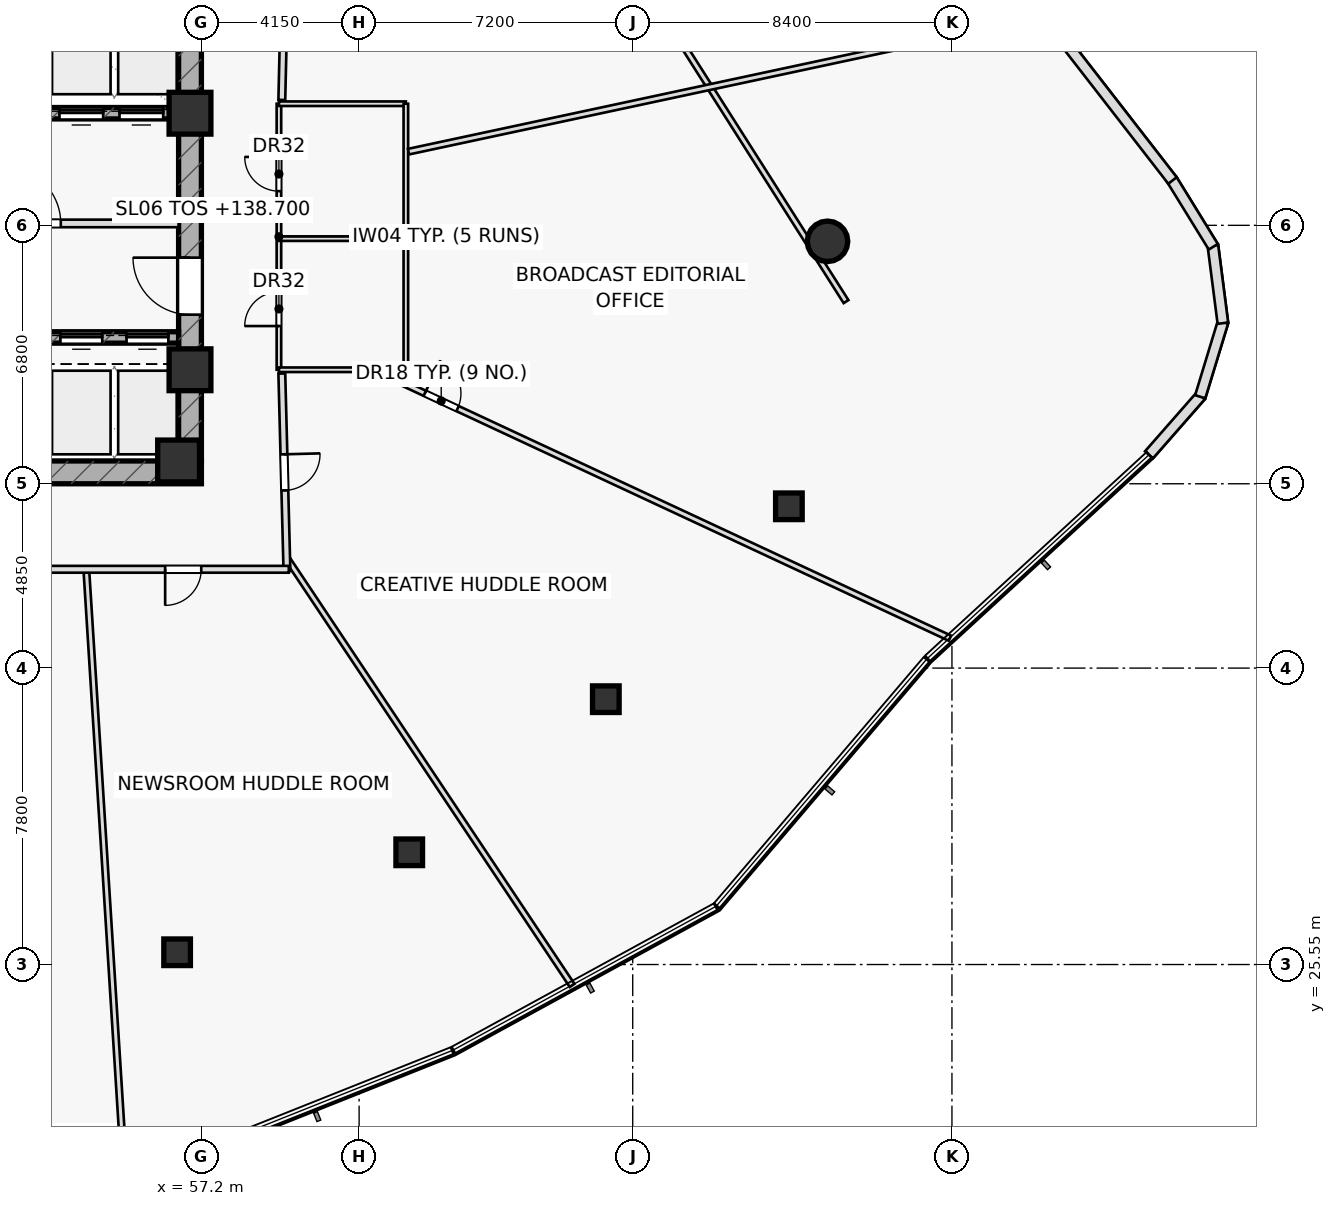
"""IFC4 building model, lengths in metres.
Left out: names, types, materials, properties, quantities, classifications, styles, units other than length and angle.
Written with IfcOpenShell. Run it as: python <this file> out.ifc"""

import sys

from ifc_helpers import new_model, si_unit, direction, frame, frame_2d, origin, origin_2d, place, context, subcontext, project, spatial, rectangle, hollow_rectangle, hollow_circle, extrude, element, fill, save


model = new_model("IFC4")
c1 = context("Model", 3, precision=1e-05, world=origin(), true_north=direction((0.0, 1.0)))
c2 = subcontext(c1, "Body", "Model", "MODEL_VIEW")
j1 = project(units=[si_unit("LENGTHUNIT", "METRE"), si_unit("PLANEANGLEUNIT", "RADIAN")], contexts=[c1])
p1 = place(None, origin())
s1 = spatial("IfcSite", under=j1, at=p1, CompositionType="ELEMENT")
p2 = place(p1, origin())
s2 = spatial("IfcBuilding", under=s1, at=p2, CompositionType="ELEMENT")
p3 = place(p2, frame((0.0, 0.0, 138.7)))
s3 = spatial("IfcBuildingStorey", under=s2, at=p3, CompositionType="ELEMENT", Elevation=138.7)
p4 = place(p3, frame((42.8, 38.5, 0.0), z_axis=(0.0, 0.0, 1.0), x_axis=(1.0, 0.0, 0.0)))
e1 = element("IfcWall", 1, at=p4, inside=s3, PredefinedType="SHEAR", context=c2, shape_type="SweptSolid", body=[
    extrude(rectangle(XDim=14.4, YDim=0.6, at=frame_2d((7.2, 0.0))), origin(), (0.0, 0.0, 1.0), 3.55),
])
p5 = place(p4, frame((0.88, 0.0, 0.0)))
e2 = element("IfcOpeningElement", 2, at=p5, cuts=e1, PredefinedType="OPENING", context=c2, shape_type="SweptSolid", body=[
    extrude(rectangle(XDim=1.05, YDim=2.2, at=frame_2d((0.525, 1.1))), frame((0.0, 0.31, 0.0), z_axis=(0.0, -1.0, 0.0), x_axis=(1.0, 0.0, 0.0)), (0.0, 0.0, 1.0), 0.62),
])
p6 = place(p3, frame((56.9, 38.8, 0.0), z_axis=(0.0, 0.0, 1.0), x_axis=(0.0, 1.0, 0.0)))
e3 = element("IfcWall", 3, at=p6, inside=s3, PredefinedType="SHEAR", context=c2, shape_type="SweptSolid", body=[
    extrude(rectangle(XDim=12.4, YDim=0.6, at=frame_2d((6.2, 0.0))), origin(), (0.0, 0.0, 1.0), 3.55),
])
p7 = place(p6, frame((3.85, 0.0, 0.0)))
e4 = element("IfcOpeningElement", 4, at=p7, cuts=e3, PredefinedType="OPENING", context=c2, shape_type="SweptSolid", body=[
    extrude(rectangle(XDim=1.5, YDim=2.2, at=frame_2d((0.75, 1.1))), frame((0.0, 0.31, 0.0), z_axis=(0.0, -1.0, 0.0), x_axis=(1.0, 0.0, 0.0)), (0.0, 0.0, 1.0), 0.62),
])
p8 = place(p3, frame((43.4, 47.95, 0.0), z_axis=(0.0, 0.0, 1.0), x_axis=(1.0, 0.0, 0.0)))
e5 = element("IfcWall", 5, at=p8, inside=s3, PredefinedType="SHEAR", context=c2, shape_type="SweptSolid", body=[
    extrude(rectangle(XDim=13.2, YDim=0.3, at=frame_2d((6.6, 0.0))), origin(), (0.0, 0.0, 1.0), 3.55),
])
p9 = place(p8, frame((8.345, 0.0, 0.0)))
e6 = element("IfcOpeningElement", 6, at=p9, cuts=e5, PredefinedType="OPENING", context=c2, shape_type="SweptSolid", body=[
    extrude(rectangle(XDim=1.15, YDim=2.2, at=frame_2d((0.575, 1.1))), frame((0.0, 0.16, 0.0), z_axis=(0.0, -1.0, 0.0), x_axis=(1.0, 0.0, 0.0)), (0.0, 0.0, 1.0), 0.32),
])
p10 = place(p8, frame((10.065, 0.0, 0.0)))
e7 = element("IfcOpeningElement", 7, at=p10, cuts=e5, PredefinedType="OPENING", context=c2, shape_type="SweptSolid", body=[
    extrude(rectangle(XDim=1.15, YDim=2.2, at=frame_2d((0.575, 1.1))), frame((0.0, 0.16, 0.0), z_axis=(0.0, -1.0, 0.0), x_axis=(1.0, 0.0, 0.0)), (0.0, 0.0, 1.0), 0.32),
])
p11 = place(p8, frame((11.645, 0.0, 0.0)))
e8 = element("IfcOpeningElement", 8, at=p11, cuts=e5, PredefinedType="OPENING", context=c2, shape_type="SweptSolid", body=[
    extrude(rectangle(XDim=1.15, YDim=2.2, at=frame_2d((0.575, 1.1))), frame((0.0, 0.16, 0.0), z_axis=(0.0, -1.0, 0.0), x_axis=(1.0, 0.0, 0.0)), (0.0, 0.0, 1.0), 0.32),
])
p12 = place(p3, frame((43.4, 42.05, 0.0), z_axis=(0.0, 0.0, 1.0), x_axis=(1.0, 0.0, 0.0)))
e9 = element("IfcWall", 9, at=p12, inside=s3, PredefinedType="SHEAR", context=c2, shape_type="SweptSolid", body=[
    extrude(rectangle(XDim=13.2, YDim=0.3, at=frame_2d((6.6, 0.0))), origin(), (0.0, 0.0, 1.0), 3.55),
])
p13 = place(p12, frame((8.37, 0.0, 0.0)))
e10 = element("IfcOpeningElement", 10, at=p13, cuts=e9, PredefinedType="OPENING", context=c2, shape_type="SweptSolid", body=[
    extrude(rectangle(XDim=1.1, YDim=2.15, at=frame_2d((0.55, 1.075))), frame((0.0, 0.16, 0.0), z_axis=(0.0, -1.0, 0.0), x_axis=(1.0, 0.0, 0.0)), (0.0, 0.0, 1.0), 0.32),
])
p14 = place(p12, frame((10.09, 0.0, 0.0)))
e11 = element("IfcOpeningElement", 11, at=p14, cuts=e9, PredefinedType="OPENING", context=c2, shape_type="SweptSolid", body=[
    extrude(rectangle(XDim=1.1, YDim=2.15, at=frame_2d((0.55, 1.075))), frame((0.0, 0.16, 0.0), z_axis=(0.0, -1.0, 0.0), x_axis=(1.0, 0.0, 0.0)), (0.0, 0.0, 1.0), 0.32),
])
p15 = place(p12, frame((11.83, 0.0, 0.0)))
e12 = element("IfcOpeningElement", 12, at=p15, cuts=e9, PredefinedType="OPENING", context=c2, shape_type="SweptSolid", body=[
    extrude(rectangle(XDim=1.1, YDim=2.15, at=frame_2d((0.55, 1.075))), frame((0.0, 0.16, 0.0), z_axis=(0.0, -1.0, 0.0), x_axis=(1.0, 0.0, 0.0)), (0.0, 0.0, 1.0), 0.32),
])
for number, where, z_axis, x_axis in (
    (13, (56.9, 47.95, 0.0), (0.0, 0.0, 1.0), (1.0, 0.0, 0.0)),
    (14, (56.9, 41.2, 0.0), (0.0, 0.0, 1.0), (1.0, 0.0, 0.0)),
    (15, (56.6, 38.8, 0.0), (0.0, 0.0, 1.0), (1.0, 0.0, 0.0)),
):
    element("IfcColumn", number, at=place(p3, frame(where, z_axis=z_axis, x_axis=x_axis)), inside=s3, PredefinedType="COLUMN", context=c2, shape_type="SweptSolid", body=[
        extrude(rectangle(XDim=1.1, YDim=1.1, at=origin_2d()), origin(), (0.0, 0.0, 1.0), 3.55),
    ])
for number, where, z_axis, x_axis in (
    (16, (56.561, 25.873, 0.0), (0.0, 0.0, 1.0), (1.0, 0.0, 0.0)),
    (17, (62.669, 28.503, 0.0), (0.0, 0.0, 1.0), (1.0, 0.0, 0.0)),
    (18, (67.842, 32.532, 0.0), (0.0, 0.0, 1.0), (1.0, 0.0, 0.0)),
    (19, (72.659, 37.607, 0.0), (0.0, 0.0, 1.0), (1.0, 0.0, 0.0)),
):
    element("IfcColumn", number, at=place(p3, frame(where, z_axis=z_axis, x_axis=x_axis)), inside=s3, PredefinedType="COLUMN", context=c2, shape_type="SweptSolid", body=[
        extrude(hollow_rectangle(XDim=0.7, YDim=0.7, WallThickness=0.04, at=origin_2d()), origin(), (0.0, 0.0, 1.0), 3.55),
    ])
p16 = place(p3, frame((73.676, 44.58, 0.0), z_axis=(0.0, 0.0, 1.0), x_axis=(1.0, 0.0, 0.0)))
e20 = element("IfcColumn", 20, at=p16, inside=s3, PredefinedType="COLUMN", context=c2, shape_type="SweptSolid", body=[
    extrude(hollow_circle(Radius=0.533, WallThickness=0.045, at=origin_2d()), origin(), (0.0, 0.0, 1.0), 3.55),
])
p17 = place(p3, frame((50.65, 45.05, 0.0), z_axis=(0.0, 0.0, 1.0), x_axis=(1.0, 0.0, 0.0)))
e21 = element("IfcWall", 21, at=p17, inside=s3, PredefinedType="PARTITIONING", context=c2, shape_type="SweptSolid", body=[
    extrude(rectangle(XDim=5.95, YDim=0.2, at=frame_2d((2.975, 0.0))), origin(), (0.0, 0.0, 1.0), 3.55),
])
p18 = place(p17, frame((1.35, 0.0, 0.0)))
e22 = element("IfcOpeningElement", 22, at=p18, cuts=e21, PredefinedType="OPENING", context=c2, shape_type="SweptSolid", body=[
    extrude(rectangle(XDim=1.5, YDim=2.2, at=frame_2d((0.75, 1.1))), frame((0.0, 0.11, 0.0), z_axis=(0.0, -1.0, 0.0), x_axis=(1.0, 0.0, 0.0)), (0.0, 0.0, 1.0), 0.22),
])
p19 = place(p3, frame((74.163, 42.993, 0.0), z_axis=(0.0, 0.0, 1.0), x_axis=(-0.53628142437, 0.844039237166, 0.0)))
e23 = element("IfcWall", 23, at=p19, inside=s3, PredefinedType="PARTITIONING", context=c2, shape_type="SweptSolid", body=[
    extrude(rectangle(XDim=10.267, YDim=0.15, at=frame_2d((5.133, 0.0))), origin(), (0.0, 0.0, 1.0), 2.835),
])
p20 = place(p3, frame((59.24, 41.2, 0.0), z_axis=(0.0, 0.0, 1.0), x_axis=(0.0, 1.0, 0.0)))
e24 = element("IfcWall", 24, at=p20, inside=s3, PredefinedType="PARTITIONING", context=c2, shape_type="SweptSolid", body=[
    extrude(rectangle(XDim=7.0, YDim=0.12, at=frame_2d((3.5, 0.0))), origin(), (0.0, 0.0, 1.0), 3.55),
])
p21 = place(p20, frame((1.15, 0.0, 0.0)))
e25 = element("IfcOpeningElement", 25, at=p21, cuts=e24, PredefinedType="OPENING", context=c2, shape_type="SweptSolid", body=[
    extrude(rectangle(XDim=0.9, YDim=2.05, at=frame_2d((0.45, 1.025))), frame((0.0, 0.07, 0.0), z_axis=(0.0, -1.0, 0.0), x_axis=(1.0, 0.0, 0.0)), (0.0, 0.0, 1.0), 0.14),
])
p22 = place(p20, frame((4.7, 0.0, 0.0)))
e26 = element("IfcOpeningElement", 26, at=p22, cuts=e24, PredefinedType="OPENING", context=c2, shape_type="SweptSolid", body=[
    extrude(rectangle(XDim=0.9, YDim=2.05, at=frame_2d((0.45, 1.025))), frame((0.0, 0.07, 0.0), z_axis=(0.0, -1.0, 0.0), x_axis=(1.0, 0.0, 0.0)), (0.0, 0.0, 1.0), 0.14),
])
for number, where, z_axis, x_axis in (
    (27, (59.24, 41.2, 0.0), (0.0, 0.0, 1.0), (1.0, 0.0, 0.0)),
    (28, (59.24, 44.65, 0.0), (0.0, 0.0, 1.0), (1.0, 0.0, 0.0)),
    (29, (59.24, 48.2, 0.0), (0.0, 0.0, 1.0), (1.0, 0.0, 0.0)),
):
    element("IfcWall", number, at=place(p3, frame(where, z_axis=z_axis, x_axis=x_axis)), inside=s3, PredefinedType="PARTITIONING", context=c2, shape_type="SweptSolid", body=[
        extrude(rectangle(XDim=3.34, YDim=0.12, at=frame_2d((1.67, 0.0))), origin(), (0.0, 0.0, 1.0), 3.55),
    ])
p23 = place(p3, frame((62.58, 41.2, 0.0), z_axis=(0.0, 0.0, 1.0), x_axis=(0.0, 1.0, 0.0)))
e30 = element("IfcWall", 30, at=p23, inside=s3, PredefinedType="PARTITIONING", context=c2, shape_type="SweptSolid", body=[
    extrude(rectangle(XDim=7.0, YDim=0.12, at=frame_2d((3.5, 0.0))), origin(), (0.0, 0.0, 1.0), 3.55),
])
p24 = place(p3, frame((61.856, 41.15, 0.0), z_axis=(0.0, 0.0, 1.0), x_axis=(0.906306749667, -0.42262048638, 0.0)))
e31 = element("IfcWall", 31, at=p24, inside=s3, PredefinedType="PARTITIONING", context=c2, shape_type="SweptSolid", body=[
    extrude(rectangle(XDim=16.596, YDim=0.15, at=frame_2d((8.298, 0.0))), origin(), (0.0, 0.0, 1.0), 2.835),
])
p25 = place(p24, frame((1.35, 0.0, 0.0)))
e32 = element("IfcOpeningElement", 32, at=p25, cuts=e31, PredefinedType="OPENING", context=c2, shape_type="SweptSolid", body=[
    extrude(rectangle(XDim=0.95, YDim=2.05, at=frame_2d((0.475, 1.025))), frame((0.0, 0.085, 0.0), z_axis=(0.0, -1.0, 0.0), x_axis=(1.0, 0.0, 0.0)), (0.0, 0.0, 1.0), 0.17),
])
p26 = place(p3, frame((62.65, 46.938, 0.0), z_axis=(0.0, 0.0, 1.0), x_axis=(0.977819728846, 0.209448270173, 0.0)))
e33 = element("IfcWall", 33, at=p26, inside=s3, PredefinedType="PARTITIONING", context=c2, shape_type="SweptSolid", body=[
    extrude(rectangle(XDim=17.123, YDim=0.15, at=frame_2d((8.562, 0.0))), origin(), (0.0, 0.0, 1.0), 2.975),
])
p27 = place(p3, frame((54.171, 35.95, 0.0), z_axis=(0.0, 0.0, 1.0), x_axis=(0.062994339198, -0.998013884287, 0.0)))
e34 = element("IfcWall", 34, at=p27, inside=s3, PredefinedType="PARTITIONING", context=c2, shape_type="SweptSolid", body=[
    extrude(rectangle(XDim=15.642, YDim=0.15, at=frame_2d((7.821, 0.0))), origin(), (0.0, 0.0, 1.0), 2.975),
])
p28 = place(p3, frame((59.442, 36.251, 0.0), z_axis=(0.0, 0.0, 1.0), x_axis=(0.555320536671, -0.831636399847, 0.0)))
e35 = element("IfcWall", 35, at=p28, inside=s3, PredefinedType="PARTITIONING", context=c2, shape_type="SweptSolid", body=[
    extrude(rectangle(XDim=13.529, YDim=0.15, at=frame_2d((6.765, 0.0))), origin(), (0.0, 0.0, 1.0), 2.975),
])
p29 = place(p3, frame((59.451, 54.1, 0.0), z_axis=(0.0, 0.0, 1.0), x_axis=(-0.023271046154, -0.999729192537, 0.0)))
e36 = element("IfcWall", 36, at=p29, inside=s3, PredefinedType="PARTITIONING", context=c2, shape_type="SweptSolid", body=[
    extrude(rectangle(XDim=5.802, YDim=0.18, at=frame_2d((2.901, 0.0))), origin(), (0.0, 0.0, 1.0), 2.835),
])
p30 = place(p29, frame((2.426, 0.0, 0.0)))
e37 = element("IfcOpeningElement", 37, at=p30, cuts=e36, PredefinedType="OPENING", context=c2, shape_type="SweptSolid", body=[
    extrude(rectangle(XDim=0.95, YDim=2.05, at=frame_2d((0.475, 1.025))), frame((0.0, 0.1, 0.0), z_axis=(0.0, -1.0, 0.0), x_axis=(1.0, 0.0, 0.0)), (0.0, 0.0, 1.0), 0.2),
])
p31 = place(p3, frame((59.316, 41.1, 0.0), z_axis=(0.0, 0.0, 1.0), x_axis=(0.025953695765, -0.999663146103, 0.0)))
e38 = element("IfcWall", 38, at=p31, inside=s3, PredefinedType="PARTITIONING", context=c2, shape_type="SweptSolid", body=[
    extrude(rectangle(XDim=5.202, YDim=0.18, at=frame_2d((2.601, 0.0))), origin(), (0.0, 0.0, 1.0), 2.835),
])
p32 = place(p31, frame((2.126, 0.0, 0.0)))
e39 = element("IfcOpeningElement", 39, at=p32, cuts=e38, PredefinedType="OPENING", context=c2, shape_type="SweptSolid", body=[
    extrude(rectangle(XDim=0.95, YDim=2.05, at=frame_2d((0.475, 1.025))), frame((0.0, 0.1, 0.0), z_axis=(0.0, -1.0, 0.0), x_axis=(1.0, 0.0, 0.0)), (0.0, 0.0, 1.0), 0.2),
])
p33 = place(p3, frame((59.5, 35.95, 0.0), z_axis=(0.0, 0.0, 1.0), x_axis=(-1.0, 0.0, 0.0)))
e40 = element("IfcWall", 40, at=p33, inside=s3, PredefinedType="PARTITIONING", context=c2, shape_type="SweptSolid", body=[
    extrude(rectangle(XDim=19.75, YDim=0.18, at=frame_2d((9.875, 0.0))), origin(), (0.0, 0.0, 1.0), 2.835),
])
p34 = place(p33, frame((2.304, 0.0, 0.0)))
e41 = element("IfcOpeningElement", 41, at=p34, cuts=e40, PredefinedType="OPENING", context=c2, shape_type="SweptSolid", body=[
    extrude(rectangle(XDim=0.95, YDim=2.05, at=frame_2d((0.475, 1.025))), frame((0.0, 0.1, 0.0), z_axis=(0.0, -1.0, 0.0), x_axis=(1.0, 0.0, 0.0)), (0.0, 0.0, 1.0), 0.2),
])
p35 = place(p33, frame((11.55, 0.0, 0.0)))
e42 = element("IfcOpeningElement", 42, at=p35, cuts=e40, PredefinedType="OPENING", context=c2, shape_type="SweptSolid", body=[
    extrude(rectangle(XDim=0.95, YDim=2.05, at=frame_2d((0.475, 1.025))), frame((0.0, 0.1, 0.0), z_axis=(0.0, -1.0, 0.0), x_axis=(1.0, 0.0, 0.0)), (0.0, 0.0, 1.0), 0.2),
])
p36 = place(p3, frame((82.135, 38.962, 0.0), z_axis=(0.0, 0.0, 1.0), x_axis=(0.659399160017, 0.751793021894, 0.0)))
e43 = element("IfcWall", 43, at=p36, inside=s3, PredefinedType="STANDARD", context=c2, shape_type="SweptSolid", body=[
    extrude(rectangle(XDim=2.066, YDim=0.28, at=frame_2d((1.033, 0.0))), origin(), (0.0, 0.0, 1.0), 3.55),
])
p37 = place(p3, frame((83.483, 40.49, 0.0), z_axis=(0.0, 0.0, 1.0), x_axis=(0.291563452565, 0.956551490056, 0.0)))
e44 = element("IfcWall", 44, at=p37, inside=s3, PredefinedType="STANDARD", context=c2, shape_type="SweptSolid", body=[
    extrude(rectangle(XDim=2.055, YDim=0.28, at=frame_2d((1.027, 0.0))), origin(), (0.0, 0.0, 1.0), 3.55),
])
p38 = place(p3, frame((84.08, 42.426, 0.0), z_axis=(0.0, 0.0, 1.0), x_axis=(-0.127850692074, 0.991793426342, 0.0)))
e45 = element("IfcWall", 45, at=p38, inside=s3, PredefinedType="STANDARD", context=c2, shape_type="SweptSolid", body=[
    extrude(rectangle(XDim=2.055, YDim=0.28, at=frame_2d((1.027, 0.0))), origin(), (0.0, 0.0, 1.0), 3.55),
])
p39 = place(p3, frame((83.827, 44.436, 0.0), z_axis=(0.0, 0.0, 1.0), x_axis=(-0.524759556433, 0.851250496583, 0.0)))
e46 = element("IfcWall", 46, at=p39, inside=s3, PredefinedType="STANDARD", context=c2, shape_type="SweptSolid", body=[
    extrude(rectangle(XDim=2.077, YDim=0.28, at=frame_2d((1.039, 0.0))), origin(), (0.0, 0.0, 1.0), 3.55),
])
p40 = place(p3, frame((82.754, 46.18, 0.0), z_axis=(0.0, 0.0, 1.0), x_axis=(-0.613223319152, 0.7899095903, 0.0)))
e47 = element("IfcWall", 47, at=p40, inside=s3, PredefinedType="STANDARD", context=c2, shape_type="SweptSolid", body=[
    extrude(rectangle(XDim=7.967, YDim=0.28, at=frame_2d((3.984, 0.0))), origin(), (0.0, 0.0, 1.0), 3.55),
])
p41 = place(p7, origin())
e48 = element("IfcDoor", 48, at=p41, inside=s3, OperationType="SINGLE_SWING_RIGHT", PredefinedType="DOOR", context=c2, shape_type="SweptSolid", body=[
    extrude(rectangle(XDim=1.5, YDim=2.2, at=frame_2d((0.75, 1.1))), frame((0.0, 0.025, 0.0), z_axis=(0.0, -1.0, 0.0), x_axis=(1.0, 0.0, 0.0)), (0.0, 0.0, 1.0), 0.05),
])
fill(e4, e48)
p42 = place(p18, origin())
e49 = element("IfcDoor", 49, at=p42, inside=s3, OperationType="SINGLE_SWING_LEFT", PredefinedType="DOOR", context=c2, shape_type="SweptSolid", body=[
    extrude(rectangle(XDim=1.5, YDim=2.2, at=frame_2d((0.75, 1.1))), frame((0.0, 0.025, 0.0), z_axis=(0.0, -1.0, 0.0), x_axis=(1.0, 0.0, 0.0)), (0.0, 0.0, 1.0), 0.05),
])
fill(e22, e49)
p43 = place(p21, origin())
e50 = element("IfcDoor", 50, at=p43, inside=s3, OperationType="SINGLE_SWING_LEFT", PredefinedType="DOOR", context=c2, shape_type="SweptSolid", body=[
    extrude(rectangle(XDim=0.9, YDim=2.05, at=frame_2d((0.45, 1.025))), frame((0.0, 0.025, 0.0), z_axis=(0.0, -1.0, 0.0), x_axis=(1.0, 0.0, 0.0)), (0.0, 0.0, 1.0), 0.05),
])
fill(e25, e50)
p44 = place(p22, origin())
e51 = element("IfcDoor", 51, at=p44, inside=s3, OperationType="SINGLE_SWING_RIGHT", PredefinedType="DOOR", context=c2, shape_type="SweptSolid", body=[
    extrude(rectangle(XDim=0.9, YDim=2.05, at=frame_2d((0.45, 1.025))), frame((0.0, 0.025, 0.0), z_axis=(0.0, -1.0, 0.0), x_axis=(1.0, 0.0, 0.0)), (0.0, 0.0, 1.0), 0.05),
])
fill(e26, e51)
p45 = place(p25, origin())
e52 = element("IfcDoor", 52, at=p45, inside=s3, OperationType="SINGLE_SWING_LEFT", PredefinedType="DOOR", context=c2, shape_type="SweptSolid", body=[
    extrude(rectangle(XDim=0.95, YDim=2.05, at=frame_2d((0.475, 1.025))), frame((0.0, 0.025, 0.0), z_axis=(0.0, -1.0, 0.0), x_axis=(1.0, 0.0, 0.0)), (0.0, 0.0, 1.0), 0.05),
])
fill(e32, e52)
p46 = place(p32, origin())
e53 = element("IfcDoor", 53, at=p46, inside=s3, OperationType="SINGLE_SWING_LEFT", PredefinedType="DOOR", context=c2, shape_type="SweptSolid", body=[
    extrude(rectangle(XDim=0.95, YDim=2.05, at=frame_2d((0.475, 1.025))), frame((0.0, 0.025, 0.0), z_axis=(0.0, -1.0, 0.0), x_axis=(1.0, 0.0, 0.0)), (0.0, 0.0, 1.0), 0.05),
])
fill(e39, e53)
p47 = place(p34, origin())
e54 = element("IfcDoor", 54, at=p47, inside=s3, OperationType="SINGLE_SWING_RIGHT", PredefinedType="DOOR", context=c2, shape_type="SweptSolid", body=[
    extrude(rectangle(XDim=0.95, YDim=2.05, at=frame_2d((0.475, 1.025))), frame((0.0, 0.025, 0.0), z_axis=(0.0, -1.0, 0.0), x_axis=(1.0, 0.0, 0.0)), (0.0, 0.0, 1.0), 0.05),
])
fill(e41, e54)
p48 = place(p10, origin())
e55 = element("IfcDoor", 55, at=p48, inside=s3, OperationType="SLIDING_TO_LEFT", PredefinedType="DOOR", context=c2, shape_type="SweptSolid", body=[
    extrude(rectangle(XDim=1.15, YDim=2.2, at=frame_2d((0.575, 1.1))), frame((0.0, 0.025, 0.0), z_axis=(0.0, -1.0, 0.0), x_axis=(1.0, 0.0, 0.0)), (0.0, 0.0, 1.0), 0.05),
])
fill(e7, e55)
p49 = place(p11, origin())
e56 = element("IfcDoor", 56, at=p49, inside=s3, OperationType="SLIDING_TO_LEFT", PredefinedType="DOOR", context=c2, shape_type="SweptSolid", body=[
    extrude(rectangle(XDim=1.15, YDim=2.2, at=frame_2d((0.575, 1.1))), frame((0.0, 0.025, 0.0), z_axis=(0.0, -1.0, 0.0), x_axis=(1.0, 0.0, 0.0)), (0.0, 0.0, 1.0), 0.05),
])
fill(e8, e56)
p50 = place(p14, origin())
e57 = element("IfcDoor", 57, at=p50, inside=s3, OperationType="SLIDING_TO_LEFT", PredefinedType="DOOR", context=c2, shape_type="SweptSolid", body=[
    extrude(rectangle(XDim=1.1, YDim=2.15, at=frame_2d((0.55, 1.075))), frame((0.0, 0.025, 0.0), z_axis=(0.0, -1.0, 0.0), x_axis=(1.0, 0.0, 0.0)), (0.0, 0.0, 1.0), 0.05),
])
fill(e11, e57)
p51 = place(p15, origin())
e58 = element("IfcDoor", 58, at=p51, inside=s3, OperationType="SLIDING_TO_LEFT", PredefinedType="DOOR", context=c2, shape_type="SweptSolid", body=[
    extrude(rectangle(XDim=1.1, YDim=2.15, at=frame_2d((0.55, 1.075))), frame((0.0, 0.025, 0.0), z_axis=(0.0, -1.0, 0.0), x_axis=(1.0, 0.0, 0.0)), (0.0, 0.0, 1.0), 0.05),
])
fill(e12, e58)
save(model, sys.argv[1])
